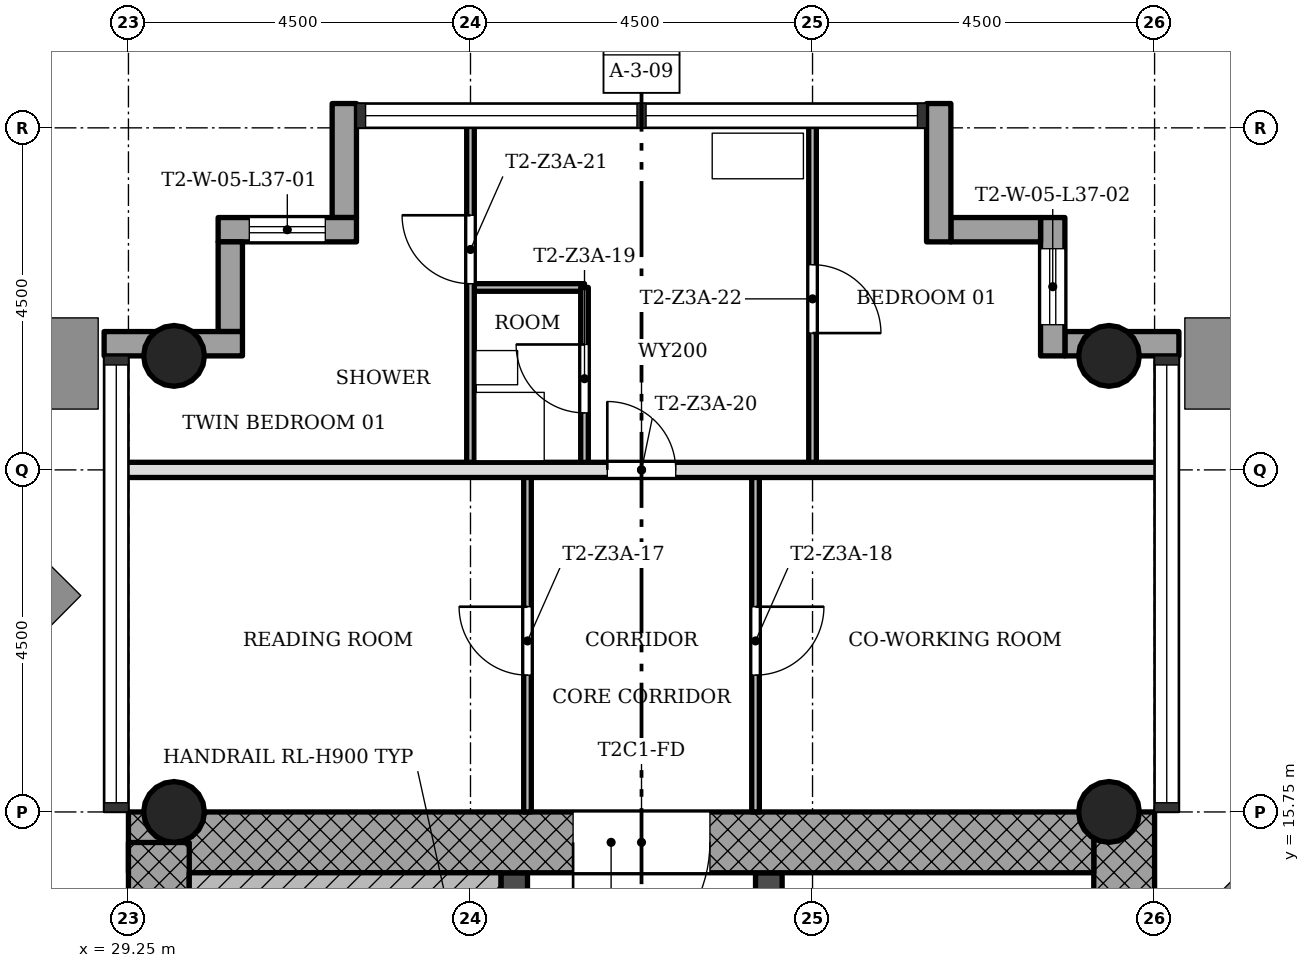
"""IFC4 building model, lengths in metres.
Left out: names, types, materials, properties, quantities, classifications, styles, units other than length and angle.
Written with IfcOpenShell. Run it as: python <this file> out.ifc"""

import sys

from ifc_helpers import new_model, si_unit, direction, frame, frame_2d, origin, origin_2d, place, context, subcontext, project, spatial, rectangle, hollow_circle, extrude, element, fill, save


model = new_model("IFC4")
c1 = context("Model", 3, precision=1e-05, world=origin(), true_north=direction((0.0, 1.0)))
c2 = subcontext(c1, "Body", "Model", "MODEL_VIEW")
j1 = project(units=[si_unit("LENGTHUNIT", "METRE"), si_unit("PLANEANGLEUNIT", "RADIAN")], contexts=[c1])
p1 = place(None, origin())
s1 = spatial("IfcSite", under=j1, at=p1, CompositionType="ELEMENT")
p2 = place(p1, origin())
s2 = spatial("IfcBuilding", under=s1, at=p2, CompositionType="ELEMENT")
p3 = place(p2, frame((0.0, 0.0, 137.1)))
s3 = spatial("IfcBuildingStorey", under=s2, at=p3, CompositionType="ELEMENT", Elevation=137.1)
p4 = place(p3, frame((42.35, 7.55, 0.0), z_axis=(0.0, 0.0, 1.0), x_axis=(0.0, 1.0, 0.0)))
e1 = element("IfcWall", 1, at=p4, inside=s3, PredefinedType="SHEAR", context=c2, shape_type="SweptSolid", body=[
    extrude(rectangle(XDim=8.2, YDim=0.8, at=frame_2d((4.1, 0.0))), origin(), (0.0, 0.0, 1.0), 3.4),
])
p5 = place(p3, frame((41.95, 15.35, 0.0), z_axis=(0.0, 0.0, 1.0), x_axis=(-1.0, 0.0, 0.0)))
e2 = element("IfcWall", 2, at=p5, inside=s3, PredefinedType="SHEAR", context=c2, shape_type="SweptSolid", body=[
    extrude(rectangle(XDim=12.7, YDim=0.8, at=frame_2d((6.35, 0.0))), origin(), (0.0, 0.0, 1.0), 3.4),
])
p6 = place(p5, frame((5.05, 0.0, 0.0)))
e3 = element("IfcOpeningElement", 3, at=p6, cuts=e2, PredefinedType="OPENING", context=c2, shape_type="SweptSolid", body=[
    extrude(rectangle(XDim=1.8, YDim=2.1, at=frame_2d((0.9, 1.05))), frame((0.0, 0.41, 0.0), z_axis=(0.0, -1.0, 0.0), x_axis=(1.0, 0.0, 0.0)), (0.0, 0.0, 1.0), 0.82),
])
p7 = place(p3, frame((29.65, 15.348, 0.0), z_axis=(0.0, 0.0, 1.0), x_axis=(0.0, -1.0, 0.0)))
e4 = element("IfcWall", 4, at=p7, inside=s3, PredefinedType="SHEAR", context=c2, shape_type="SweptSolid", body=[
    extrude(rectangle(XDim=8.796, YDim=0.8, at=frame_2d((4.398, 0.0))), origin(), (0.0, 0.0, 1.0), 3.4),
])
p8 = place(p3, frame((34.325, 7.55, 0.0), z_axis=(0.0, 0.0, 1.0), x_axis=(0.0, 1.0, 0.0)))
e5 = element("IfcWall", 5, at=p8, inside=s3, PredefinedType="SHEAR", context=c2, shape_type="SweptSolid", body=[
    extrude(rectangle(XDim=7.4, YDim=0.35, at=frame_2d((3.7, 0.0))), origin(), (0.0, 0.0, 1.0), 3.4),
])
p9 = place(p8, frame((0.85, 0.0, 0.0)))
e6 = element("IfcOpeningElement", 6, at=p9, cuts=e5, PredefinedType="OPENING", context=c2, shape_type="SweptSolid", body=[
    extrude(rectangle(XDim=0.9, YDim=2.1, at=frame_2d((0.45, 1.05))), frame((0.0, 0.185, 0.0), z_axis=(0.0, -1.0, 0.0), x_axis=(1.0, 0.0, 0.0)), (0.0, 0.0, 1.0), 0.37),
])
p10 = place(p3, frame((37.675, 7.55, 0.0), z_axis=(0.0, 0.0, 1.0), x_axis=(0.0, 1.0, 0.0)))
e7 = element("IfcWall", 7, at=p10, inside=s3, PredefinedType="SHEAR", context=c2, shape_type="SweptSolid", body=[
    extrude(rectangle(XDim=7.4, YDim=0.35, at=frame_2d((3.7, 0.0))), origin(), (0.0, 0.0, 1.0), 3.4),
])
p11 = place(p10, frame((0.95, 0.0, 0.0)))
e8 = element("IfcOpeningElement", 8, at=p11, cuts=e7, PredefinedType="OPENING", context=c2, shape_type="SweptSolid", body=[
    extrude(rectangle(XDim=1.1, YDim=2.1, at=frame_2d((0.55, 1.05))), frame((0.0, 0.185, 0.0), z_axis=(0.0, -1.0, 0.0), x_axis=(1.0, 0.0, 0.0)), (0.0, 0.0, 1.0), 0.37),
])
p12 = place(p10, frame((3.15, 0.0, 0.0)))
e9 = element("IfcOpeningElement", 9, at=p12, cuts=e7, PredefinedType="OPENING", context=c2, shape_type="SweptSolid", body=[
    extrude(rectangle(XDim=1.1, YDim=2.1, at=frame_2d((0.55, 1.05))), frame((0.0, 0.185, 0.0), z_axis=(0.0, -1.0, 0.0), x_axis=(1.0, 0.0, 0.0)), (0.0, 0.0, 1.0), 0.37),
])
p13 = place(p10, frame((5.35, 0.0, 0.0)))
e10 = element("IfcOpeningElement", 10, at=p13, cuts=e7, PredefinedType="OPENING", context=c2, shape_type="SweptSolid", body=[
    extrude(rectangle(XDim=1.1, YDim=2.1, at=frame_2d((0.55, 1.05))), frame((0.0, 0.185, 0.0), z_axis=(0.0, -1.0, 0.0), x_axis=(1.0, 0.0, 0.0)), (0.0, 0.0, 1.0), 0.37),
])
for number, where, z_axis, x_axis in (
    (11, (42.15, 15.75, 0.0), (0.0, 0.0, 1.0), (1.0, 0.0, 0.0)),
    (12, (29.85, 15.75, 0.0), (0.0, 0.0, 1.0), (1.0, 0.0, 0.0)),
    (13, (42.15, 21.75, 0.0), (0.0, 0.0, 1.0), (1.0, 0.0, 0.0)),
    (14, (29.85, 21.75, 0.0), (0.0, 0.0, 1.0), (1.0, 0.0, 0.0)),
):
    element("IfcColumn", number, at=place(p3, frame(where, z_axis=z_axis, x_axis=x_axis)), inside=s3, PredefinedType="COLUMN", context=c2, shape_type="SweptSolid", body=[
        extrude(hollow_circle(Radius=0.4, WallThickness=0.028, at=origin_2d()), origin(), (0.0, 0.0, 1.0), 3.4),
    ])
p14 = place(p3, frame((43.07, 21.91, -0.3), z_axis=(0.0, 0.0, 1.0), x_axis=(-1.0, 0.0, 0.0)))
e15 = element("IfcWall", 15, at=p14, inside=s3, PredefinedType="STANDARD", context=c2, shape_type="SweptSolid", body=[
    extrude(rectangle(XDim=1.5, YDim=0.32, at=frame_2d((0.75, 0.0))), origin(), (0.0, 0.0, 1.0), 3.4),
])
p15 = place(p3, frame((41.41, 21.75, -0.3), z_axis=(0.0, 0.0, 1.0), x_axis=(0.0, 1.0, 0.0)))
e16 = element("IfcWall", 16, at=p15, inside=s3, PredefinedType="STANDARD", context=c2, shape_type="SweptSolid", body=[
    extrude(rectangle(XDim=1.82, YDim=0.32, at=frame_2d((0.91, 0.0))), origin(), (0.0, 0.0, 1.0), 3.4),
])
p16 = place(p15, frame((0.41, 0.0, 1.2)))
e17 = element("IfcOpeningElement", 17, at=p16, cuts=e16, PredefinedType="OPENING", context=c2, shape_type="SweptSolid", body=[
    extrude(rectangle(XDim=1.0, YDim=1.5, at=frame_2d((0.5, 0.75))), frame((0.0, 0.17, 0.0), z_axis=(0.0, -1.0, 0.0), x_axis=(1.0, 0.0, 0.0)), (0.0, 0.0, 1.0), 0.34),
])
p17 = place(p3, frame((41.25, 23.41, -0.3), z_axis=(0.0, 0.0, 1.0), x_axis=(-1.0, 0.0, 0.0)))
e18 = element("IfcWall", 18, at=p17, inside=s3, PredefinedType="STANDARD", context=c2, shape_type="SweptSolid", body=[
    extrude(rectangle(XDim=1.18, YDim=0.32, at=frame_2d((0.59, 0.0))), origin(), (0.0, 0.0, 1.0), 3.4),
])
p18 = place(p3, frame((39.91, 23.25, -0.3), z_axis=(0.0, 0.0, 1.0), x_axis=(0.0, 1.0, 0.0)))
e19 = element("IfcWall", 19, at=p18, inside=s3, PredefinedType="STANDARD", context=c2, shape_type="SweptSolid", body=[
    extrude(rectangle(XDim=1.82, YDim=0.32, at=frame_2d((0.91, 0.0))), origin(), (0.0, 0.0, 1.0), 3.4),
])
p19 = place(p3, frame((32.09, 25.07, -0.3), z_axis=(0.0, 0.0, 1.0), x_axis=(0.0, -1.0, 0.0)))
e20 = element("IfcWall", 20, at=p19, inside=s3, PredefinedType="STANDARD", context=c2, shape_type="SweptSolid", body=[
    extrude(rectangle(XDim=1.5, YDim=0.32, at=frame_2d((0.75, 0.0))), origin(), (0.0, 0.0, 1.0), 3.4),
])
p20 = place(p3, frame((32.25, 23.41, -0.3), z_axis=(0.0, 0.0, 1.0), x_axis=(-1.0, 0.0, 0.0)))
e21 = element("IfcWall", 21, at=p20, inside=s3, PredefinedType="STANDARD", context=c2, shape_type="SweptSolid", body=[
    extrude(rectangle(XDim=1.82, YDim=0.32, at=frame_2d((0.91, 0.0))), origin(), (0.0, 0.0, 1.0), 3.4),
])
p21 = place(p20, frame((0.41, 0.0, 1.2)))
e22 = element("IfcOpeningElement", 22, at=p21, cuts=e21, PredefinedType="OPENING", context=c2, shape_type="SweptSolid", body=[
    extrude(rectangle(XDim=1.0, YDim=1.5, at=frame_2d((0.5, 0.75))), frame((0.0, 0.17, 0.0), z_axis=(0.0, -1.0, 0.0), x_axis=(1.0, 0.0, 0.0)), (0.0, 0.0, 1.0), 0.34),
])
p22 = place(p3, frame((30.59, 23.25, -0.3), z_axis=(0.0, 0.0, 1.0), x_axis=(0.0, -1.0, 0.0)))
e23 = element("IfcWall", 23, at=p22, inside=s3, PredefinedType="STANDARD", context=c2, shape_type="SweptSolid", body=[
    extrude(rectangle(XDim=1.18, YDim=0.32, at=frame_2d((0.59, 0.0))), origin(), (0.0, 0.0, 1.0), 3.4),
])
p23 = place(p3, frame((30.75, 21.91, -0.3), z_axis=(0.0, 0.0, 1.0), x_axis=(-1.0, 0.0, 0.0)))
e24 = element("IfcWall", 24, at=p23, inside=s3, PredefinedType="STANDARD", context=c2, shape_type="SweptSolid", body=[
    extrude(rectangle(XDim=1.82, YDim=0.32, at=frame_2d((0.91, 0.0))), origin(), (0.0, 0.0, 1.0), 3.4),
])
p24 = place(p3, frame((42.85, 20.25, 0.0), z_axis=(0.0, 0.0, 1.0), x_axis=(-1.0, 0.0, 0.0)))
e25 = element("IfcWall", 25, at=p24, inside=s3, PredefinedType="SOLIDWALL", context=c2, shape_type="SweptSolid", body=[
    extrude(rectangle(XDim=13.7, YDim=0.2, at=frame_2d((6.85, 0.0))), origin(), (0.0, 0.0, 1.0), 3.0),
])
p25 = place(p24, frame((6.4, 0.0, 0.0)))
e26 = element("IfcOpeningElement", 26, at=p25, cuts=e25, PredefinedType="OPENING", context=c2, shape_type="SweptSolid", body=[
    extrude(rectangle(XDim=0.9, YDim=2.1, at=frame_2d((0.45, 1.05))), frame((0.0, 0.11, 0.0), z_axis=(0.0, -1.0, 0.0), x_axis=(1.0, 0.0, 0.0)), (0.0, 0.0, 1.0), 0.22),
])
p26 = place(p3, frame((35.25, 22.65, 0.0), z_axis=(0.0, 0.0, 1.0), x_axis=(-1.0, 0.0, 0.0)))
e27 = element("IfcWall", 27, at=p26, inside=s3, PredefinedType="PARTITIONING", context=c2, shape_type="SweptSolid", body=[
    extrude(rectangle(XDim=1.5, YDim=0.1, at=frame_2d((0.75, 0.0))), origin(), (0.0, 0.0, 1.0), 3.0),
])
p27 = place(p3, frame((38.25, 20.25, 0.0), z_axis=(0.0, 0.0, 1.0), x_axis=(0.0, 1.0, 0.0)))
e28 = element("IfcWall", 28, at=p27, inside=s3, PredefinedType="PARTITIONING", context=c2, shape_type="SweptSolid", body=[
    extrude(rectangle(XDim=4.6, YDim=0.1, at=frame_2d((2.3, 0.0))), origin(), (0.0, 0.0, 1.0), 3.0),
])
p28 = place(p27, frame((1.8, 0.0, 0.0)))
e29 = element("IfcOpeningElement", 29, at=p28, cuts=e28, PredefinedType="OPENING", context=c2, shape_type="SweptSolid", body=[
    extrude(rectangle(XDim=0.9, YDim=2.1, at=frame_2d((0.45, 1.05))), frame((0.0, 0.06, 0.0), z_axis=(0.0, -1.0, 0.0), x_axis=(1.0, 0.0, 0.0)), (0.0, 0.0, 1.0), 0.12),
])
p29 = place(p3, frame((37.5, 15.75, 0.0), z_axis=(0.0, 0.0, 1.0), x_axis=(0.0, 1.0, 0.0)))
e30 = element("IfcWall", 30, at=p29, inside=s3, PredefinedType="PARTITIONING", context=c2, shape_type="SweptSolid", body=[
    extrude(rectangle(XDim=4.5, YDim=0.1, at=frame_2d((2.25, 0.0))), origin(), (0.0, 0.0, 1.0), 3.0),
])
p30 = place(p29, frame((1.8, 0.0, 0.0)))
e31 = element("IfcOpeningElement", 31, at=p30, cuts=e30, PredefinedType="OPENING", context=c2, shape_type="SweptSolid", body=[
    extrude(rectangle(XDim=0.9, YDim=2.1, at=frame_2d((0.45, 1.05))), frame((0.0, 0.06, 0.0), z_axis=(0.0, -1.0, 0.0), x_axis=(1.0, 0.0, 0.0)), (0.0, 0.0, 1.0), 0.12),
])
p31 = place(p3, frame((35.25, 20.25, 0.0), z_axis=(0.0, 0.0, 1.0), x_axis=(0.0, 1.0, 0.0)))
e32 = element("IfcWall", 32, at=p31, inside=s3, PredefinedType="PARTITIONING", context=c2, shape_type="SweptSolid", body=[
    extrude(rectangle(XDim=2.4, YDim=0.1, at=frame_2d((1.2, 0.0))), origin(), (0.0, 0.0, 1.0), 3.0),
])
p32 = place(p31, frame((0.75, 0.0, 0.0)))
e33 = element("IfcOpeningElement", 33, at=p32, cuts=e32, PredefinedType="OPENING", context=c2, shape_type="SweptSolid", body=[
    extrude(rectangle(XDim=0.9, YDim=2.1, at=frame_2d((0.45, 1.05))), frame((0.0, 0.06, 0.0), z_axis=(0.0, -1.0, 0.0), x_axis=(1.0, 0.0, 0.0)), (0.0, 0.0, 1.0), 0.12),
])
p33 = place(p3, frame((34.5, 15.75, 0.0), z_axis=(0.0, 0.0, 1.0), x_axis=(0.0, 1.0, 0.0)))
e34 = element("IfcWall", 34, at=p33, inside=s3, PredefinedType="PARTITIONING", context=c2, shape_type="SweptSolid", body=[
    extrude(rectangle(XDim=4.5, YDim=0.1, at=frame_2d((2.25, 0.0))), origin(), (0.0, 0.0, 1.0), 3.0),
])
p34 = place(p33, frame((1.8, 0.0, 0.0)))
e35 = element("IfcOpeningElement", 35, at=p34, cuts=e34, PredefinedType="OPENING", context=c2, shape_type="SweptSolid", body=[
    extrude(rectangle(XDim=0.9, YDim=2.1, at=frame_2d((0.45, 1.05))), frame((0.0, 0.06, 0.0), z_axis=(0.0, -1.0, 0.0), x_axis=(1.0, 0.0, 0.0)), (0.0, 0.0, 1.0), 0.12),
])
p35 = place(p3, frame((33.75, 20.25, 0.0), z_axis=(0.0, 0.0, 1.0), x_axis=(0.0, 1.0, 0.0)))
e36 = element("IfcWall", 36, at=p35, inside=s3, PredefinedType="PARTITIONING", context=c2, shape_type="SweptSolid", body=[
    extrude(rectangle(XDim=4.6, YDim=0.1, at=frame_2d((2.3, 0.0))), origin(), (0.0, 0.0, 1.0), 3.0),
])
p36 = place(p35, frame((2.45, 0.0, 0.0)))
e37 = element("IfcOpeningElement", 37, at=p36, cuts=e36, PredefinedType="OPENING", context=c2, shape_type="SweptSolid", body=[
    extrude(rectangle(XDim=0.9, YDim=2.1, at=frame_2d((0.45, 1.05))), frame((0.0, 0.06, 0.0), z_axis=(0.0, -1.0, 0.0), x_axis=(1.0, 0.0, 0.0)), (0.0, 0.0, 1.0), 0.12),
])
p37 = place(p3, frame((34.15, 14.75, 0.0), z_axis=(0.0, 0.0, 1.0), x_axis=(-1.0, 0.0, 0.0)))
e38 = element("IfcWall", 38, at=p37, inside=s3, PredefinedType="SHEAR", context=c2, shape_type="SweptSolid", body=[
    extrude(rectangle(XDim=4.1, YDim=0.4, at=frame_2d((2.05, 0.0))), origin(), (0.0, 0.0, 1.0), 3.4),
])
p38 = place(p34, origin())
e39 = element("IfcDoor", 39, at=p38, inside=s3, OperationType="SINGLE_SWING_LEFT", PredefinedType="DOOR", context=c2, shape_type="SweptSolid", body=[
    extrude(rectangle(XDim=0.9, YDim=2.1, at=frame_2d((0.45, 1.05))), frame((0.0, 0.025, 0.0), z_axis=(0.0, -1.0, 0.0), x_axis=(1.0, 0.0, 0.0)), (0.0, 0.0, 1.0), 0.05),
])
fill(e35, e39)
p39 = place(p30, origin())
e40 = element("IfcDoor", 40, at=p39, inside=s3, OperationType="SINGLE_SWING_RIGHT", PredefinedType="DOOR", context=c2, shape_type="SweptSolid", body=[
    extrude(rectangle(XDim=0.9, YDim=2.1, at=frame_2d((0.45, 1.05))), frame((0.0, 0.025, 0.0), z_axis=(0.0, -1.0, 0.0), x_axis=(1.0, 0.0, 0.0)), (0.0, 0.0, 1.0), 0.05),
])
fill(e31, e40)
p40 = place(p32, origin())
e41 = element("IfcDoor", 41, at=p40, inside=s3, OperationType="SINGLE_SWING_LEFT", PredefinedType="DOOR", context=c2, shape_type="SweptSolid", body=[
    extrude(rectangle(XDim=0.9, YDim=2.1, at=frame_2d((0.45, 1.05))), frame((0.0, 0.025, 0.0), z_axis=(0.0, -1.0, 0.0), x_axis=(1.0, 0.0, 0.0)), (0.0, 0.0, 1.0), 0.05),
])
fill(e33, e41)
p41 = place(p25, origin())
e42 = element("IfcDoor", 42, at=p41, inside=s3, OperationType="SINGLE_SWING_RIGHT", PredefinedType="DOOR", context=c2, shape_type="SweptSolid", body=[
    extrude(rectangle(XDim=0.9, YDim=2.1, at=frame_2d((0.45, 1.05))), frame((0.0, 0.025, 0.0), z_axis=(0.0, -1.0, 0.0), x_axis=(1.0, 0.0, 0.0)), (0.0, 0.0, 1.0), 0.05),
])
fill(e26, e42)
p42 = place(p36, origin())
e43 = element("IfcDoor", 43, at=p42, inside=s3, OperationType="SINGLE_SWING_LEFT", PredefinedType="DOOR", context=c2, shape_type="SweptSolid", body=[
    extrude(rectangle(XDim=0.9, YDim=2.1, at=frame_2d((0.45, 1.05))), frame((0.0, 0.025, 0.0), z_axis=(0.0, -1.0, 0.0), x_axis=(1.0, 0.0, 0.0)), (0.0, 0.0, 1.0), 0.05),
])
fill(e37, e43)
p43 = place(p28, origin())
e44 = element("IfcDoor", 44, at=p43, inside=s3, OperationType="SINGLE_SWING_LEFT", PredefinedType="DOOR", context=c2, shape_type="SweptSolid", body=[
    extrude(rectangle(XDim=0.9, YDim=2.1, at=frame_2d((0.45, 1.05))), frame((0.0, 0.025, 0.0), z_axis=(0.0, -1.0, 0.0), x_axis=(1.0, 0.0, 0.0)), (0.0, 0.0, 1.0), 0.05),
])
fill(e29, e44)
p44 = place(p6, origin())
e45 = element("IfcDoor", 45, at=p44, inside=s3, OperationType="SINGLE_SWING_LEFT", PredefinedType="DOOR", context=c2, shape_type="SweptSolid", body=[
    extrude(rectangle(XDim=1.8, YDim=2.1, at=frame_2d((0.9, 1.05))), frame((0.0, 0.025, 0.0), z_axis=(0.0, -1.0, 0.0), x_axis=(1.0, 0.0, 0.0)), (0.0, 0.0, 1.0), 0.05),
])
fill(e3, e45)
p45 = place(p21, origin())
e46 = element("IfcWindow", 46, at=p45, inside=s3, PartitioningType="SINGLE_PANEL", PredefinedType="WINDOW", context=c2, shape_type="SweptSolid", body=[
    extrude(rectangle(XDim=1.0, YDim=1.5, at=frame_2d((0.5, 0.75))), frame((0.0, 0.03, 0.0), z_axis=(0.0, -1.0, 0.0), x_axis=(1.0, 0.0, 0.0)), (0.0, 0.0, 1.0), 0.06),
])
fill(e22, e46)
p46 = place(p16, origin())
e47 = element("IfcWindow", 47, at=p46, inside=s3, PartitioningType="SINGLE_PANEL", PredefinedType="WINDOW", context=c2, shape_type="SweptSolid", body=[
    extrude(rectangle(XDim=1.0, YDim=1.5, at=frame_2d((0.5, 0.75))), frame((0.0, 0.03, 0.0), z_axis=(0.0, -1.0, 0.0), x_axis=(1.0, 0.0, 0.0)), (0.0, 0.0, 1.0), 0.06),
])
fill(e17, e47)
save(model, sys.argv[1])
